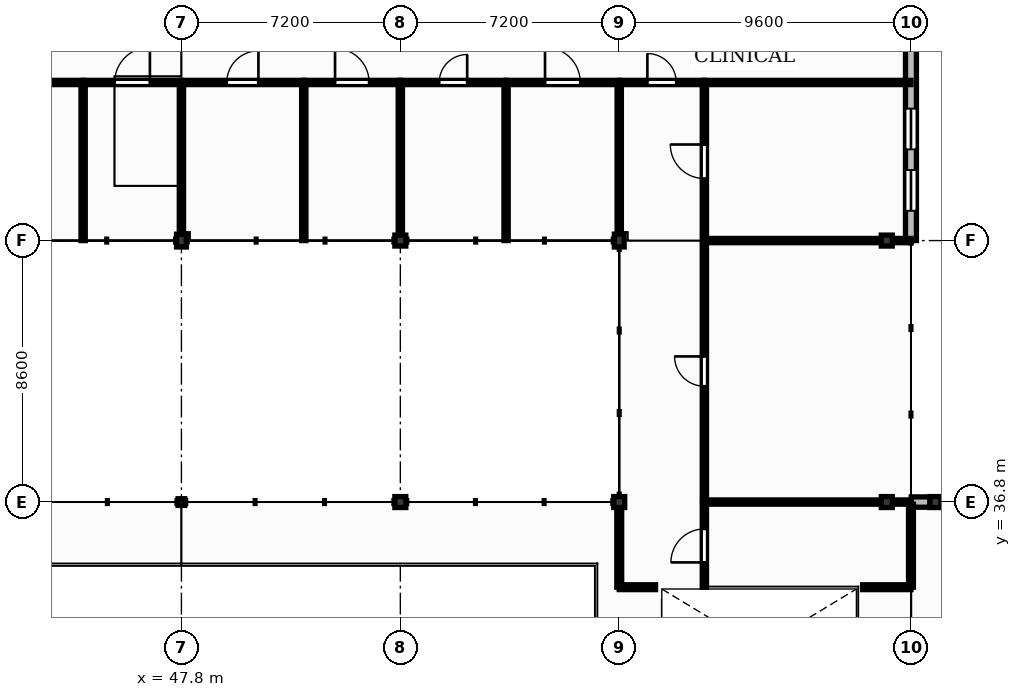
"""IFC4 building model, lengths in metres.
Left out: names, types, materials, properties, quantities, classifications, styles, units other than length and angle.
Written with IfcOpenShell. Run it as: python <this file> out.ifc"""

import sys

from ifc_helpers import new_model, si_unit, direction, frame, frame_2d, origin, origin_2d, place, context, subcontext, project, spatial, rectangle, hollow_circle, extrude, element, fill, save


model = new_model("IFC4")
c1 = context("Model", 3, precision=1e-05, world=origin(), true_north=direction((0.0, 1.0)))
c2 = subcontext(c1, "Body", "Model", "MODEL_VIEW")
j1 = project(units=[si_unit("LENGTHUNIT", "METRE"), si_unit("PLANEANGLEUNIT", "RADIAN")], contexts=[c1])
p1 = place(None, origin())
s1 = spatial("IfcSite", under=j1, at=p1, CompositionType="ELEMENT")
p2 = place(p1, origin())
s2 = spatial("IfcBuilding", under=s1, at=p2, CompositionType="ELEMENT")
p3 = place(p2, frame((0.0, 0.0, 4.5)))
s3 = spatial("IfcBuildingStorey", under=s2, at=p3, CompositionType="ELEMENT", Elevation=4.5)
p4 = place(p3, frame((72.6, 36.8, 0.0), z_axis=(0.0, 0.0, 1.0), x_axis=(1.0, 0.0, 0.0)))
e1 = element("IfcColumn", 1, at=p4, inside=s3, PredefinedType="COLUMN", context=c2, shape_type="SweptSolid", body=[
    extrude(rectangle(XDim=0.36, YDim=0.36, at=origin_2d()), origin(), (0.0, 0.0, 1.0), 4.3),
])
p5 = place(p3, frame((47.8, 36.8, 0.0), z_axis=(0.0, 0.0, 1.0), x_axis=(1.0, 0.0, 0.0)))
e2 = element("IfcColumn", 2, at=p5, inside=s3, PredefinedType="COLUMN", context=c2, shape_type="SweptSolid", body=[
    extrude(hollow_circle(Radius=0.11, WallThickness=0.01, at=origin_2d()), origin(), (0.0, 0.0, 1.0), 4.3),
])
p6 = place(p3, frame((47.8, 45.4, 0.0), z_axis=(0.0, 0.0, 1.0), x_axis=(1.0, 0.0, 0.0)))
e3 = element("IfcColumn", 3, at=p6, inside=s3, PredefinedType="COLUMN", context=c2, shape_type="SweptSolid", body=[
    extrude(rectangle(XDim=0.32, YDim=0.42, at=origin_2d()), origin(), (0.0, 0.0, 1.0), 4.26),
])
p7 = place(p3, frame((55.0, 36.8, 0.0), z_axis=(0.0, 0.0, 1.0), x_axis=(1.0, 0.0, 0.0)))
e4 = element("IfcColumn", 4, at=p7, inside=s3, PredefinedType="COLUMN", context=c2, shape_type="SweptSolid", body=[
    extrude(rectangle(XDim=0.36, YDim=0.36, at=origin_2d()), origin(), (0.0, 0.0, 1.0), 4.3),
])
p8 = place(p3, frame((55.0, 45.4, 0.0), z_axis=(0.0, 0.0, 1.0), x_axis=(1.0, 0.0, 0.0)))
e5 = element("IfcColumn", 5, at=p8, inside=s3, PredefinedType="COLUMN", context=c2, shape_type="SweptSolid", body=[
    extrude(rectangle(XDim=0.36, YDim=0.36, at=origin_2d()), origin(), (0.0, 0.0, 1.0), 4.26),
])
p9 = place(p3, frame((62.2, 36.8, 0.0), z_axis=(0.0, 0.0, 1.0), x_axis=(1.0, 0.0, 0.0)))
e6 = element("IfcColumn", 6, at=p9, inside=s3, PredefinedType="COLUMN", context=c2, shape_type="SweptSolid", body=[
    extrude(rectangle(XDim=0.36, YDim=0.36, at=origin_2d()), origin(), (0.0, 0.0, 1.0), 4.3),
])
p10 = place(p3, frame((62.2, 45.4, 0.0), z_axis=(0.0, 0.0, 1.0), x_axis=(1.0, 0.0, 0.0)))
e7 = element("IfcColumn", 7, at=p10, inside=s3, PredefinedType="COLUMN", context=c2, shape_type="SweptSolid", body=[
    extrude(rectangle(XDim=0.32, YDim=0.42, at=origin_2d()), origin(), (0.0, 0.0, 1.0), 4.26),
])
p11 = place(p3, frame((71.0, 36.8, 0.0), z_axis=(0.0, 0.0, 1.0), x_axis=(1.0, 0.0, 0.0)))
e8 = element("IfcColumn", 8, at=p11, inside=s3, PredefinedType="COLUMN", context=c2, shape_type="SweptSolid", body=[
    extrude(rectangle(XDim=0.36, YDim=0.36, at=origin_2d()), origin(), (0.0, 0.0, 1.0), 4.3),
])
p12 = place(p3, frame((71.0, 45.4, 0.0), z_axis=(0.0, 0.0, 1.0), x_axis=(1.0, 0.0, 0.0)))
e9 = element("IfcColumn", 9, at=p12, inside=s3, PredefinedType="COLUMN", context=c2, shape_type="SweptSolid", body=[
    extrude(rectangle(XDim=0.36, YDim=0.36, at=origin_2d()), origin(), (0.0, 0.0, 1.0), 4.26),
])
p13 = place(p3, frame((71.795, 45.4, 0.0), z_axis=(0.0, 0.0, 1.0), x_axis=(0.0, 1.0, 0.0)))
e10 = element("IfcWall", 10, at=p13, inside=s3, PredefinedType="SOLIDWALL", context=c2, shape_type="SweptSolid", body=[
    extrude(rectangle(XDim=7.2, YDim=0.36, at=frame_2d((3.6, 0.0))), origin(), (0.0, 0.0, 1.0), 4.26),
])
p14 = place(p13, frame((0.98, 0.0, 1.0)))
e11 = element("IfcOpeningElement", 11, at=p14, cuts=e10, PredefinedType="OPENING", context=c2, shape_type="SweptSolid", body=[
    extrude(rectangle(XDim=1.34, YDim=1.95, at=frame_2d((0.67, 0.975))), frame((0.0, 0.19, 0.0), z_axis=(0.0, -1.0, 0.0), x_axis=(1.0, 0.0, 0.0)), (0.0, 0.0, 1.0), 0.38),
])
p15 = place(p13, frame((3.0, 0.0, 1.0)))
e12 = element("IfcOpeningElement", 12, at=p15, cuts=e10, PredefinedType="OPENING", context=c2, shape_type="SweptSolid", body=[
    extrude(rectangle(XDim=1.34, YDim=1.95, at=frame_2d((0.67, 0.975))), frame((0.0, 0.19, 0.0), z_axis=(0.0, -1.0, 0.0), x_axis=(1.0, 0.0, 0.0)), (0.0, 0.0, 1.0), 0.38),
])
p16 = place(p3, frame((71.805, 36.8, 0.0), z_axis=(0.0, 0.0, 1.0), x_axis=(1.0, 0.0, 0.0)))
e13 = element("IfcWall", 13, at=p16, inside=s3, PredefinedType="SOLIDWALL", context=c2, shape_type="SweptSolid", body=[
    extrude(rectangle(XDim=0.615, YDim=0.34, at=frame_2d((0.308, 0.0))), origin(), (0.0, 0.0, 1.0), 4.3),
])
p17 = place(p3, frame((40.6, 50.6, 0.0), z_axis=(0.0, 0.0, 1.0), x_axis=(1.0, 0.0, 0.0)))
e14 = element("IfcWall", 14, at=p17, inside=s3, PredefinedType="PARTITIONING", context=c2, shape_type="SweptSolid", body=[
    extrude(rectangle(XDim=3.967, YDim=0.14, at=frame_2d((1.983, 0.0))), origin(), (0.0, 0.0, 1.0), 4.18),
])
p18 = place(p17, frame((1.523, 0.0, 0.0)))
e15 = element("IfcOpeningElement", 15, at=p18, cuts=e14, PredefinedType="OPENING", context=c2, shape_type="SweptSolid", body=[
    extrude(rectangle(XDim=0.92, YDim=2.1, at=frame_2d((0.46, 1.05))), frame((0.0, 0.08, 0.0), z_axis=(0.0, -1.0, 0.0), x_axis=(1.0, 0.0, 0.0)), (0.0, 0.0, 1.0), 0.16),
])
p19 = place(p3, frame((44.567, 45.4, 0.0), z_axis=(0.0, 0.0, 1.0), x_axis=(0.0, 1.0, 0.0)))
e16 = element("IfcWall", 16, at=p19, inside=s3, PredefinedType="PARTITIONING", context=c2, shape_type="SweptSolid", body=[
    extrude(rectangle(XDim=5.13, YDim=0.14, at=frame_2d((2.565, 0.0))), origin(), (0.0, 0.0, 1.0), 4.18),
])
p20 = place(p3, frame((44.567, 50.6, 0.0), z_axis=(0.0, 0.0, 1.0), x_axis=(1.0, 0.0, 0.0)))
e17 = element("IfcWall", 17, at=p20, inside=s3, PredefinedType="PARTITIONING", context=c2, shape_type="SweptSolid", body=[
    extrude(rectangle(XDim=3.233, YDim=0.14, at=frame_2d((1.617, 0.0))), origin(), (0.0, 0.0, 1.0), 4.18),
])
p21 = place(p20, frame((1.037, 0.0, 0.0)))
e18 = element("IfcOpeningElement", 18, at=p21, cuts=e17, PredefinedType="OPENING", context=c2, shape_type="SweptSolid", body=[
    extrude(rectangle(XDim=1.16, YDim=2.1, at=frame_2d((0.58, 1.05))), frame((0.0, 0.08, 0.0), z_axis=(0.0, -1.0, 0.0), x_axis=(1.0, 0.0, 0.0)), (0.0, 0.0, 1.0), 0.16),
])
p22 = place(p3, frame((47.8, 45.61, 0.0), z_axis=(0.0, 0.0, 1.0), x_axis=(0.0, 1.0, 0.0)))
e19 = element("IfcWall", 19, at=p22, inside=s3, PredefinedType="PARTITIONING", context=c2, shape_type="SweptSolid", body=[
    extrude(rectangle(XDim=4.92, YDim=0.14, at=frame_2d((2.46, 0.0))), origin(), (0.0, 0.0, 1.0), 3.74),
])
p23 = place(p3, frame((47.8, 50.6, 0.0), z_axis=(0.0, 0.0, 1.0), x_axis=(1.0, 0.0, 0.0)))
e20 = element("IfcWall", 20, at=p23, inside=s3, PredefinedType="PARTITIONING", context=c2, shape_type="SweptSolid", body=[
    extrude(rectangle(XDim=4.025, YDim=0.14, at=frame_2d((2.012, 0.0))), origin(), (0.0, 0.0, 1.0), 4.18),
])
p24 = place(p23, frame((1.492, 0.0, 0.0)))
e21 = element("IfcOpeningElement", 21, at=p24, cuts=e20, PredefinedType="OPENING", context=c2, shape_type="SweptSolid", body=[
    extrude(rectangle(XDim=1.04, YDim=2.1, at=frame_2d((0.52, 1.05))), frame((0.0, 0.08, 0.0), z_axis=(0.0, -1.0, 0.0), x_axis=(1.0, 0.0, 0.0)), (0.0, 0.0, 1.0), 0.16),
])
p25 = place(p3, frame((51.825, 45.4, 0.0), z_axis=(0.0, 0.0, 1.0), x_axis=(0.0, 1.0, 0.0)))
e22 = element("IfcWall", 22, at=p25, inside=s3, PredefinedType="PARTITIONING", context=c2, shape_type="SweptSolid", body=[
    extrude(rectangle(XDim=5.13, YDim=0.14, at=frame_2d((2.565, 0.0))), origin(), (0.0, 0.0, 1.0), 4.18),
])
p26 = place(p3, frame((51.825, 50.6, 0.0), z_axis=(0.0, 0.0, 1.0), x_axis=(1.0, 0.0, 0.0)))
e23 = element("IfcWall", 23, at=p26, inside=s3, PredefinedType="PARTITIONING", context=c2, shape_type="SweptSolid", body=[
    extrude(rectangle(XDim=3.175, YDim=0.14, at=frame_2d((1.587, 0.0))), origin(), (0.0, 0.0, 1.0), 4.18),
])
p27 = place(p26, frame((1.028, 0.0, 0.0)))
e24 = element("IfcOpeningElement", 24, at=p27, cuts=e23, PredefinedType="OPENING", context=c2, shape_type="SweptSolid", body=[
    extrude(rectangle(XDim=1.12, YDim=2.15, at=frame_2d((0.56, 1.075))), frame((0.0, 0.08, 0.0), z_axis=(0.0, -1.0, 0.0), x_axis=(1.0, 0.0, 0.0)), (0.0, 0.0, 1.0), 0.16),
])
p28 = place(p3, frame((55.0, 45.58, 0.0), z_axis=(0.0, 0.0, 1.0), x_axis=(0.0, 1.0, 0.0)))
e25 = element("IfcWall", 25, at=p28, inside=s3, PredefinedType="PARTITIONING", context=c2, shape_type="SweptSolid", body=[
    extrude(rectangle(XDim=4.95, YDim=0.14, at=frame_2d((2.475, 0.0))), origin(), (0.0, 0.0, 1.0), 3.74),
])
p29 = place(p3, frame((55.0, 50.6, 0.0), z_axis=(0.0, 0.0, 1.0), x_axis=(1.0, 0.0, 0.0)))
e26 = element("IfcWall", 26, at=p29, inside=s3, PredefinedType="PARTITIONING", context=c2, shape_type="SweptSolid", body=[
    extrude(rectangle(XDim=3.478, YDim=0.14, at=frame_2d((1.739, 0.0))), origin(), (0.0, 0.0, 1.0), 4.18),
])
p30 = place(p29, frame((1.279, 0.0, 0.0)))
e27 = element("IfcOpeningElement", 27, at=p30, cuts=e26, PredefinedType="OPENING", context=c2, shape_type="SweptSolid", body=[
    extrude(rectangle(XDim=0.92, YDim=2.1, at=frame_2d((0.46, 1.05))), frame((0.0, 0.08, 0.0), z_axis=(0.0, -1.0, 0.0), x_axis=(1.0, 0.0, 0.0)), (0.0, 0.0, 1.0), 0.16),
])
p31 = place(p3, frame((58.478, 45.4, 0.0), z_axis=(0.0, 0.0, 1.0), x_axis=(0.0, 1.0, 0.0)))
e28 = element("IfcWall", 28, at=p31, inside=s3, PredefinedType="PARTITIONING", context=c2, shape_type="SweptSolid", body=[
    extrude(rectangle(XDim=5.13, YDim=0.14, at=frame_2d((2.565, 0.0))), origin(), (0.0, 0.0, 1.0), 4.18),
])
p32 = place(p3, frame((58.478, 50.6, 0.0), z_axis=(0.0, 0.0, 1.0), x_axis=(1.0, 0.0, 0.0)))
e29 = element("IfcWall", 29, at=p32, inside=s3, PredefinedType="PARTITIONING", context=c2, shape_type="SweptSolid", body=[
    extrude(rectangle(XDim=3.722, YDim=0.14, at=frame_2d((1.861, 0.0))), origin(), (0.0, 0.0, 1.0), 4.18),
])
p33 = place(p32, frame((1.281, 0.0, 0.0)))
e30 = element("IfcOpeningElement", 30, at=p33, cuts=e29, PredefinedType="OPENING", context=c2, shape_type="SweptSolid", body=[
    extrude(rectangle(XDim=1.16, YDim=2.1, at=frame_2d((0.58, 1.05))), frame((0.0, 0.08, 0.0), z_axis=(0.0, -1.0, 0.0), x_axis=(1.0, 0.0, 0.0)), (0.0, 0.0, 1.0), 0.16),
])
p34 = place(p3, frame((62.2, 45.61, 0.0), z_axis=(0.0, 0.0, 1.0), x_axis=(0.0, 1.0, 0.0)))
e31 = element("IfcWall", 31, at=p34, inside=s3, PredefinedType="PARTITIONING", context=c2, shape_type="SweptSolid", body=[
    extrude(rectangle(XDim=4.92, YDim=0.14, at=frame_2d((2.46, 0.0))), origin(), (0.0, 0.0, 1.0), 3.74),
])
p35 = place(p3, frame((62.2, 50.6, 0.0), z_axis=(0.0, 0.0, 1.0), x_axis=(1.0, 0.0, 0.0)))
e32 = element("IfcWall", 32, at=p35, inside=s3, PredefinedType="PARTITIONING", context=c2, shape_type="SweptSolid", body=[
    extrude(rectangle(XDim=2.8, YDim=0.14, at=frame_2d((1.4, 0.0))), origin(), (0.0, 0.0, 1.0), 4.18),
])
p36 = place(p35, frame((0.925, 0.0, 0.0)))
e33 = element("IfcOpeningElement", 33, at=p36, cuts=e32, PredefinedType="OPENING", context=c2, shape_type="SweptSolid", body=[
    extrude(rectangle(XDim=0.95, YDim=2.1, at=frame_2d((0.475, 1.05))), frame((0.0, 0.08, 0.0), z_axis=(0.0, -1.0, 0.0), x_axis=(1.0, 0.0, 0.0)), (0.0, 0.0, 1.0), 0.16),
])
p37 = place(p3, frame((65.0, 34.0, 0.0), z_axis=(0.0, 0.0, 1.0), x_axis=(0.0, 1.0, 0.0)))
e34 = element("IfcWall", 34, at=p37, inside=s3, PredefinedType="PARTITIONING", context=c2, shape_type="SweptSolid", body=[
    extrude(rectangle(XDim=2.73, YDim=0.14, at=frame_2d((1.365, 0.0))), origin(), (0.0, 0.0, 1.0), 4.18),
])
p38 = place(p37, frame((0.815, 0.0, 0.0)))
e35 = element("IfcOpeningElement", 35, at=p38, cuts=e34, PredefinedType="OPENING", context=c2, shape_type="SweptSolid", body=[
    extrude(rectangle(XDim=1.1, YDim=2.1, at=frame_2d((0.55, 1.05))), frame((0.0, 0.08, 0.0), z_axis=(0.0, -1.0, 0.0), x_axis=(1.0, 0.0, 0.0)), (0.0, 0.0, 1.0), 0.16),
])
p39 = place(p3, frame((65.0, 36.87, 0.0), z_axis=(0.0, 0.0, 1.0), x_axis=(0.0, 1.0, 0.0)))
e36 = element("IfcWall", 36, at=p39, inside=s3, PredefinedType="PARTITIONING", context=c2, shape_type="SweptSolid", body=[
    extrude(rectangle(XDim=8.46, YDim=0.14, at=frame_2d((4.23, 0.0))), origin(), (0.0, 0.0, 1.0), 4.18),
])
p40 = place(p39, frame((3.74, 0.0, 0.0)))
e37 = element("IfcOpeningElement", 37, at=p40, cuts=e36, PredefinedType="OPENING", context=c2, shape_type="SweptSolid", body=[
    extrude(rectangle(XDim=0.98, YDim=2.15, at=frame_2d((0.49, 1.075))), frame((0.0, 0.08, 0.0), z_axis=(0.0, -1.0, 0.0), x_axis=(1.0, 0.0, 0.0)), (0.0, 0.0, 1.0), 0.16),
])
p41 = place(p3, frame((65.0, 36.8, 0.0), z_axis=(0.0, 0.0, 1.0), x_axis=(1.0, 0.0, 0.0)))
e38 = element("IfcWall", 38, at=p41, inside=s3, PredefinedType="PARTITIONING", context=c2, shape_type="SweptSolid", body=[
    extrude(rectangle(XDim=5.82, YDim=0.14, at=frame_2d((2.91, 0.0))), origin(), (0.0, 0.0, 1.0), 3.85),
])
p42 = place(p3, frame((71.18, 36.8, 0.0), z_axis=(0.0, 0.0, 1.0), x_axis=(1.0, 0.0, 0.0)))
e39 = element("IfcWall", 39, at=p42, inside=s3, PredefinedType="PARTITIONING", context=c2, shape_type="SweptSolid", body=[
    extrude(rectangle(XDim=0.615, YDim=0.14, at=frame_2d((0.308, 0.0))), origin(), (0.0, 0.0, 1.0), 4.18),
])
p43 = place(p3, frame((65.0, 45.47, 0.0), z_axis=(0.0, 0.0, 1.0), x_axis=(0.0, 1.0, 0.0)))
e40 = element("IfcWall", 40, at=p43, inside=s3, PredefinedType="PARTITIONING", context=c2, shape_type="SweptSolid", body=[
    extrude(rectangle(XDim=5.06, YDim=0.14, at=frame_2d((2.53, 0.0))), origin(), (0.0, 0.0, 1.0), 4.18),
])
p44 = place(p43, frame((1.97, 0.0, 0.0)))
e41 = element("IfcOpeningElement", 41, at=p44, cuts=e40, PredefinedType="OPENING", context=c2, shape_type="SweptSolid", body=[
    extrude(rectangle(XDim=1.12, YDim=2.15, at=frame_2d((0.56, 1.075))), frame((0.0, 0.08, 0.0), z_axis=(0.0, -1.0, 0.0), x_axis=(1.0, 0.0, 0.0)), (0.0, 0.0, 1.0), 0.16),
])
p45 = place(p3, frame((65.0, 45.4, 0.0), z_axis=(0.0, 0.0, 1.0), x_axis=(1.0, 0.0, 0.0)))
e42 = element("IfcWall", 42, at=p45, inside=s3, PredefinedType="PARTITIONING", context=c2, shape_type="SweptSolid", body=[
    extrude(rectangle(XDim=5.82, YDim=0.14, at=frame_2d((2.91, 0.0))), origin(), (0.0, 0.0, 1.0), 3.8),
])
p46 = place(p3, frame((71.18, 45.4, 0.0), z_axis=(0.0, 0.0, 1.0), x_axis=(1.0, 0.0, 0.0)))
e43 = element("IfcWall", 43, at=p46, inside=s3, PredefinedType="PARTITIONING", context=c2, shape_type="SweptSolid", body=[
    extrude(rectangle(XDim=0.615, YDim=0.14, at=frame_2d((0.308, 0.0))), origin(), (0.0, 0.0, 1.0), 4.18),
])
p47 = place(p3, frame((65.0, 50.6, 0.0), z_axis=(0.0, 0.0, 1.0), x_axis=(1.0, 0.0, 0.0)))
e44 = element("IfcWall", 44, at=p47, inside=s3, PredefinedType="PARTITIONING", context=c2, shape_type="SweptSolid", body=[
    extrude(rectangle(XDim=6.795, YDim=0.14, at=frame_2d((3.397, 0.0))), origin(), (0.0, 0.0, 1.0), 4.18),
])
p48 = place(p3, frame((62.2, 34.0, 0.0), z_axis=(0.0, 0.0, 1.0), x_axis=(1.0, 0.0, 0.0)))
e45 = element("IfcWall", 45, at=p48, inside=s3, PredefinedType="PARTITIONING", context=c2, shape_type="SweptSolid", body=[
    extrude(rectangle(XDim=1.195, YDim=0.16, at=frame_2d((0.597, 0.0))), origin(), (0.0, 0.0, 1.0), 4.18),
])
p49 = place(p3, frame((62.2, 34.0, 0.0), z_axis=(0.0, 0.0, 1.0), x_axis=(0.0, 1.0, 0.0)))
e46 = element("IfcWall", 46, at=p49, inside=s3, PredefinedType="PARTITIONING", context=c2, shape_type="SweptSolid", body=[
    extrude(rectangle(XDim=2.62, YDim=0.16, at=frame_2d((1.31, 0.0))), origin(), (0.0, 0.0, 1.0), 4.18),
])
p50 = place(p3, frame((70.206, 34.0, 0.0), z_axis=(0.0, 0.0, 1.0), x_axis=(1.0, 0.0, 0.0)))
e47 = element("IfcWall", 47, at=p50, inside=s3, PredefinedType="PARTITIONING", context=c2, shape_type="SweptSolid", body=[
    extrude(rectangle(XDim=1.589, YDim=0.16, at=frame_2d((0.795, 0.0))), origin(), (0.0, 0.0, 1.0), 4.18),
])
p51 = place(p3, frame((71.795, 34.0, 0.0), z_axis=(0.0, 0.0, 1.0), x_axis=(0.0, 1.0, 0.0)))
e48 = element("IfcWall", 48, at=p51, inside=s3, PredefinedType="PARTITIONING", context=c2, shape_type="SweptSolid", body=[
    extrude(rectangle(XDim=2.73, YDim=0.16, at=frame_2d((1.365, 0.0))), origin(), (0.0, 0.0, 1.0), 4.18),
])
p52 = place(p14, origin())
e49 = element("IfcWindow", 49, at=p52, inside=s3, PartitioningType="SINGLE_PANEL", PredefinedType="WINDOW", context=c2, shape_type="SweptSolid", body=[
    extrude(rectangle(XDim=1.34, YDim=1.95, at=frame_2d((0.67, 0.975))), frame((0.0, 0.03, 0.0), z_axis=(0.0, -1.0, 0.0), x_axis=(1.0, 0.0, 0.0)), (0.0, 0.0, 1.0), 0.06),
])
fill(e11, e49)
p53 = place(p15, origin())
e50 = element("IfcWindow", 50, at=p53, inside=s3, PartitioningType="SINGLE_PANEL", PredefinedType="WINDOW", context=c2, shape_type="SweptSolid", body=[
    extrude(rectangle(XDim=1.34, YDim=1.95, at=frame_2d((0.67, 0.975))), frame((0.0, 0.03, 0.0), z_axis=(0.0, -1.0, 0.0), x_axis=(1.0, 0.0, 0.0)), (0.0, 0.0, 1.0), 0.06),
])
fill(e12, e50)
p54 = place(p36, origin())
e51 = element("IfcDoor", 51, at=p54, inside=s3, OperationType="SINGLE_SWING_LEFT", PredefinedType="DOOR", context=c2, shape_type="SweptSolid", body=[
    extrude(rectangle(XDim=0.95, YDim=2.1, at=frame_2d((0.475, 1.05))), frame((0.0, 0.025, 0.0), z_axis=(0.0, -1.0, 0.0), x_axis=(1.0, 0.0, 0.0)), (0.0, 0.0, 1.0), 0.05),
])
fill(e33, e51)
p55 = place(p38, origin())
e52 = element("IfcDoor", 52, at=p55, inside=s3, OperationType="SINGLE_SWING_LEFT", PredefinedType="DOOR", context=c2, shape_type="SweptSolid", body=[
    extrude(rectangle(XDim=1.1, YDim=2.1, at=frame_2d((0.55, 1.05))), frame((0.0, 0.025, 0.0), z_axis=(0.0, -1.0, 0.0), x_axis=(1.0, 0.0, 0.0)), (0.0, 0.0, 1.0), 0.05),
])
fill(e35, e52)
p56 = place(p40, origin())
e53 = element("IfcDoor", 53, at=p56, inside=s3, OperationType="SINGLE_SWING_RIGHT", PredefinedType="DOOR", context=c2, shape_type="SweptSolid", body=[
    extrude(rectangle(XDim=0.98, YDim=2.15, at=frame_2d((0.49, 1.075))), frame((0.0, 0.025, 0.0), z_axis=(0.0, -1.0, 0.0), x_axis=(1.0, 0.0, 0.0)), (0.0, 0.0, 1.0), 0.05),
])
fill(e37, e53)
p57 = place(p21, origin())
e54 = element("IfcDoor", 54, at=p57, inside=s3, OperationType="SINGLE_SWING_RIGHT", PredefinedType="DOOR", context=c2, shape_type="SweptSolid", body=[
    extrude(rectangle(XDim=1.16, YDim=2.1, at=frame_2d((0.58, 1.05))), frame((0.0, 0.025, 0.0), z_axis=(0.0, -1.0, 0.0), x_axis=(1.0, 0.0, 0.0)), (0.0, 0.0, 1.0), 0.05),
])
fill(e18, e54)
p58 = place(p24, origin())
e55 = element("IfcDoor", 55, at=p58, inside=s3, OperationType="SINGLE_SWING_RIGHT", PredefinedType="DOOR", context=c2, shape_type="SweptSolid", body=[
    extrude(rectangle(XDim=1.04, YDim=2.1, at=frame_2d((0.52, 1.05))), frame((0.0, 0.025, 0.0), z_axis=(0.0, -1.0, 0.0), x_axis=(1.0, 0.0, 0.0)), (0.0, 0.0, 1.0), 0.05),
])
fill(e21, e55)
p59 = place(p27, origin())
e56 = element("IfcDoor", 56, at=p59, inside=s3, OperationType="SINGLE_SWING_LEFT", PredefinedType="DOOR", context=c2, shape_type="SweptSolid", body=[
    extrude(rectangle(XDim=1.12, YDim=2.15, at=frame_2d((0.56, 1.075))), frame((0.0, 0.025, 0.0), z_axis=(0.0, -1.0, 0.0), x_axis=(1.0, 0.0, 0.0)), (0.0, 0.0, 1.0), 0.05),
])
fill(e24, e56)
p60 = place(p30, origin())
e57 = element("IfcDoor", 57, at=p60, inside=s3, OperationType="SINGLE_SWING_RIGHT", PredefinedType="DOOR", context=c2, shape_type="SweptSolid", body=[
    extrude(rectangle(XDim=0.92, YDim=2.1, at=frame_2d((0.46, 1.05))), frame((0.0, 0.025, 0.0), z_axis=(0.0, -1.0, 0.0), x_axis=(1.0, 0.0, 0.0)), (0.0, 0.0, 1.0), 0.05),
])
fill(e27, e57)
p61 = place(p33, origin())
e58 = element("IfcDoor", 58, at=p61, inside=s3, OperationType="SINGLE_SWING_LEFT", PredefinedType="DOOR", context=c2, shape_type="SweptSolid", body=[
    extrude(rectangle(XDim=1.16, YDim=2.1, at=frame_2d((0.58, 1.05))), frame((0.0, 0.025, 0.0), z_axis=(0.0, -1.0, 0.0), x_axis=(1.0, 0.0, 0.0)), (0.0, 0.0, 1.0), 0.05),
])
fill(e30, e58)
p62 = place(p44, origin())
e59 = element("IfcDoor", 59, at=p62, inside=s3, OperationType="SINGLE_SWING_RIGHT", PredefinedType="DOOR", context=c2, shape_type="SweptSolid", body=[
    extrude(rectangle(XDim=1.12, YDim=2.15, at=frame_2d((0.56, 1.075))), frame((0.0, 0.025, 0.0), z_axis=(0.0, -1.0, 0.0), x_axis=(1.0, 0.0, 0.0)), (0.0, 0.0, 1.0), 0.05),
])
fill(e41, e59)
save(model, sys.argv[1])
